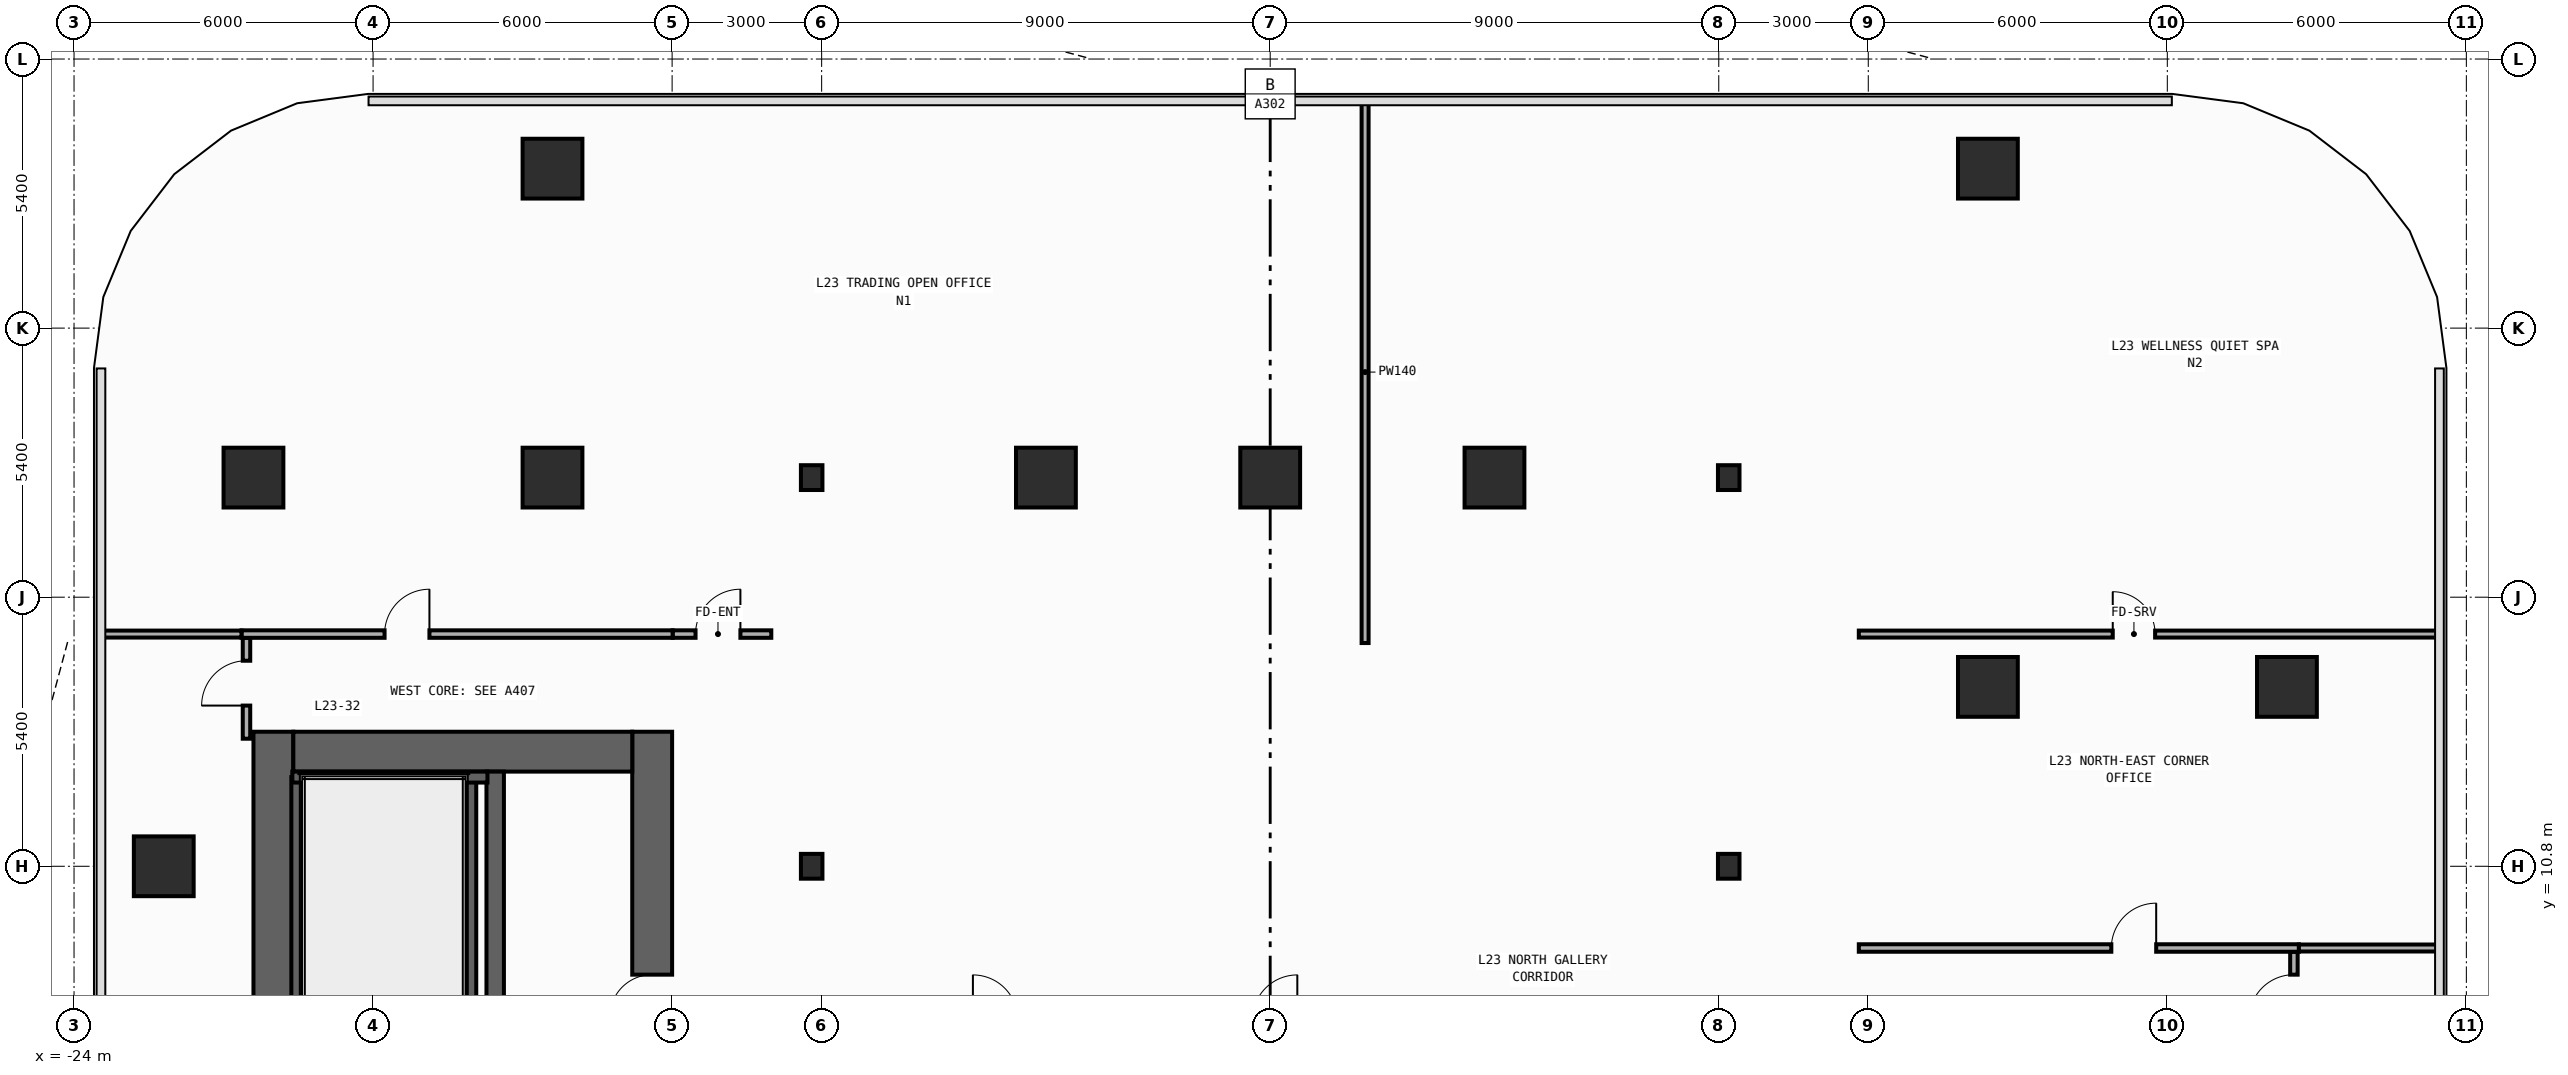
"""IFC4 building model, lengths in metres.
Left out: names, types, materials, properties, quantities, classifications, styles, units other than length and angle.
Written with IfcOpenShell. Run it as: python <this file> out.ifc"""

import sys

from ifc_helpers import new_model, si_unit, direction, frame, frame_2d, origin, origin_2d, place, context, subcontext, project, spatial, rectangle, i_section, extrude, element, fill, save


model = new_model("IFC4")
c1 = context("Model", 3, precision=1e-05, world=origin(), true_north=direction((0.0, 1.0)))
c2 = subcontext(c1, "Body", "Model", "MODEL_VIEW")
j1 = project(units=[si_unit("LENGTHUNIT", "METRE"), si_unit("PLANEANGLEUNIT", "RADIAN")], contexts=[c1])
p1 = place(None, origin())
s1 = spatial("IfcSite", under=j1, at=p1, CompositionType="ELEMENT")
p2 = place(p1, origin())
s2 = spatial("IfcBuilding", under=s1, at=p2, CompositionType="ELEMENT")
p3 = place(p2, frame((0.0, 0.0, 101.6)))
s3 = spatial("IfcBuildingStorey", under=s2, at=p3, CompositionType="ELEMENT", Elevation=101.6)
p4 = place(p3, frame((-20.0, -13.5, 0.0), z_axis=(0.0, 0.0, 1.0), x_axis=(0.0, 1.0, 0.0)))
e1 = element("IfcWall", 1, at=p4, inside=s3, PredefinedType="SHEAR", context=c2, shape_type="SweptSolid", body=[
    extrude(rectangle(XDim=27.0, YDim=0.8, at=frame_2d((13.5, 0.0))), origin(), (0.0, 0.0, 1.0), 3.94),
])
p5 = place(p3, frame((-12.4, -13.5, 0.0), z_axis=(0.0, 0.0, 1.0), x_axis=(0.0, 1.0, 0.0)))
e2 = element("IfcWall", 2, at=p5, inside=s3, PredefinedType="SHEAR", context=c2, shape_type="SweptSolid", body=[
    extrude(rectangle(XDim=27.0, YDim=0.8, at=frame_2d((13.5, 0.0))), origin(), (0.0, 0.0, 1.0), 3.94),
])
p6 = place(p5, frame((10.35, 0.0, 0.0)))
e3 = element("IfcOpeningElement", 3, at=p6, cuts=e2, PredefinedType="OPENING", context=c2, shape_type="SweptSolid", body=[
    extrude(rectangle(XDim=1.1, YDim=2.2, at=frame_2d((0.55, 1.1))), frame((0.0, 0.41, 0.0), z_axis=(0.0, -1.0, 0.0), x_axis=(1.0, 0.0, 0.0)), (0.0, 0.0, 1.0), 0.82),
])
p7 = place(p5, frame((7.15, 0.0, 0.0)))
e4 = element("IfcOpeningElement", 4, at=p7, cuts=e2, PredefinedType="OPENING", context=c2, shape_type="SweptSolid", body=[
    extrude(rectangle(XDim=1.1, YDim=2.2, at=frame_2d((0.55, 1.1))), frame((0.0, 0.41, 0.0), z_axis=(0.0, -1.0, 0.0), x_axis=(1.0, 0.0, 0.0)), (0.0, 0.0, 1.0), 0.82),
])
p8 = place(p5, frame((3.95, 0.0, 0.0)))
e5 = element("IfcOpeningElement", 5, at=p8, cuts=e2, PredefinedType="OPENING", context=c2, shape_type="SweptSolid", body=[
    extrude(rectangle(XDim=1.1, YDim=2.2, at=frame_2d((0.55, 1.1))), frame((0.0, 0.41, 0.0), z_axis=(0.0, -1.0, 0.0), x_axis=(1.0, 0.0, 0.0)), (0.0, 0.0, 1.0), 0.82),
])
p9 = place(p5, frame((15.175, 0.0, 0.0)))
e6 = element("IfcOpeningElement", 6, at=p9, cuts=e2, PredefinedType="OPENING", context=c2, shape_type="SweptSolid", body=[
    extrude(rectangle(XDim=0.85, YDim=2.1, at=frame_2d((0.425, 1.05))), frame((0.0, 0.41, 0.0), z_axis=(0.0, -1.0, 0.0), x_axis=(1.0, 0.0, 0.0)), (0.0, 0.0, 1.0), 0.82),
])
p10 = place(p5, frame((21.275, 0.0, 0.0)))
e7 = element("IfcOpeningElement", 7, at=p10, cuts=e2, PredefinedType="OPENING", context=c2, shape_type="SweptSolid", body=[
    extrude(rectangle(XDim=0.85, YDim=2.1, at=frame_2d((0.425, 1.05))), frame((0.0, 0.41, 0.0), z_axis=(0.0, -1.0, 0.0), x_axis=(1.0, 0.0, 0.0)), (0.0, 0.0, 1.0), 0.82),
])
p11 = place(p5, frame((12.725, 0.0, 0.0)))
e8 = element("IfcOpeningElement", 8, at=p11, cuts=e2, PredefinedType="OPENING", context=c2, shape_type="SweptSolid", body=[
    extrude(rectangle(XDim=1.15, YDim=2.2, at=frame_2d((0.575, 1.1))), frame((0.0, 0.41, 0.0), z_axis=(0.0, -1.0, 0.0), x_axis=(1.0, 0.0, 0.0)), (0.0, 0.0, 1.0), 0.82),
])
p12 = place(p5, frame((1.625, 0.0, 0.0)))
e9 = element("IfcOpeningElement", 9, at=p12, cuts=e2, PredefinedType="OPENING", context=c2, shape_type="SweptSolid", body=[
    extrude(rectangle(XDim=0.85, YDim=2.1, at=frame_2d((0.425, 1.05))), frame((0.0, 0.41, 0.0), z_axis=(0.0, -1.0, 0.0), x_axis=(1.0, 0.0, 0.0)), (0.0, 0.0, 1.0), 0.82),
])
p13 = place(p3, frame((-19.6, 13.1, 0.0), z_axis=(0.0, 0.0, 1.0), x_axis=(1.0, 0.0, 0.0)))
e10 = element("IfcWall", 10, at=p13, inside=s3, PredefinedType="SHEAR", context=c2, shape_type="SweptSolid", body=[
    extrude(rectangle(XDim=6.8, YDim=0.8, at=frame_2d((3.4, 0.0))), origin(), (0.0, 0.0, 1.0), 3.94),
])
p14 = place(p3, frame((-15.55, -12.7, 0.0), z_axis=(0.0, 0.0, 1.0), x_axis=(0.0, 1.0, 0.0)))
e11 = element("IfcWall", 11, at=p14, inside=s3, PredefinedType="SHEAR", context=c2, shape_type="SweptSolid", body=[
    extrude(rectangle(XDim=25.4, YDim=0.35, at=frame_2d((12.7, 0.0))), origin(), (0.0, 0.0, 1.0), 3.94),
])
p15 = place(p14, frame((11.925, 0.0, 0.0)))
e12 = element("IfcOpeningElement", 12, at=p15, cuts=e11, PredefinedType="OPENING", context=c2, shape_type="SweptSolid", body=[
    extrude(rectangle(XDim=1.15, YDim=2.2, at=frame_2d((0.575, 1.1))), frame((0.0, 0.185, 0.0), z_axis=(0.0, -1.0, 0.0), x_axis=(1.0, 0.0, 0.0)), (0.0, 0.0, 1.0), 0.37),
])
p16 = place(p14, frame((0.825, 0.0, 0.0)))
e13 = element("IfcOpeningElement", 13, at=p16, cuts=e11, PredefinedType="OPENING", context=c2, shape_type="SweptSolid", body=[
    extrude(rectangle(XDim=0.85, YDim=2.1, at=frame_2d((0.425, 1.05))), frame((0.0, 0.185, 0.0), z_axis=(0.0, -1.0, 0.0), x_axis=(1.0, 0.0, 0.0)), (0.0, 0.0, 1.0), 0.37),
])
for number, where, z_axis, x_axis in (
    (14, (-16.04, 1.29, 0.0), (0.0, 0.0, 1.0), (0.0, 1.0, 0.0)),
    (15, (-19.53, 1.29, 0.0), (0.0, 0.0, 1.0), (0.0, 1.0, 0.0)),
):
    element("IfcWall", number, at=place(p3, frame(where, z_axis=z_axis, x_axis=x_axis)), inside=s3, PredefinedType="SHEAR", context=c2, shape_type="SweptSolid", body=[
        extrude(rectangle(XDim=11.3, YDim=0.22, at=frame_2d((5.65, 0.0))), origin(), (0.0, 0.0, 1.0), 3.94),
    ])
p17 = place(p3, frame((-19.62, 12.59, 0.0), z_axis=(0.0, 0.0, 1.0), x_axis=(1.0, 0.0, 0.0)))
e16 = element("IfcWall", 16, at=p17, inside=s3, PredefinedType="SHEAR", context=c2, shape_type="SweptSolid", body=[
    extrude(rectangle(XDim=3.915, YDim=0.22, at=frame_2d((1.958, 0.0))), origin(), (0.0, 0.0, 1.0), 3.94),
])
for number, where, z_axis, x_axis in (
    (17, (-9.2, 10.8, 0.0), (0.0, 0.0, 1.0), (1.0, 0.0, 0.0)),
    (18, (-9.2, 18.6, 0.0), (0.0, 0.0, 1.0), (1.0, 0.0, 0.0)),
    (19, (9.2, 10.8, 0.0), (0.0, 0.0, 1.0), (1.0, 0.0, 0.0)),
    (20, (9.2, 18.6, 0.0), (0.0, 0.0, 1.0), (1.0, 0.0, 0.0)),
):
    element("IfcColumn", number, at=place(p3, frame(where, z_axis=z_axis, x_axis=x_axis)), inside=s3, PredefinedType="COLUMN", context=c2, shape_type="SweptSolid", body=[
        extrude(i_section(OverallWidth=0.432, OverallDepth=0.498, WebThickness=0.045, FlangeThickness=0.07, FilletRadius=0.022, at=origin_2d()), origin(), (0.0, 0.0, 1.0), 4.2),
    ])
for number, where, z_axis, x_axis in (
    (21, (-20.4, 18.6, 0.0), (0.0, 0.0, 1.0), (1.0, 0.0, 0.0)),
    (22, (20.4, 14.4, 0.0), (0.0, 0.0, 1.0), (1.0, 0.0, 0.0)),
    (23, (-14.4, 18.6, 0.0), (0.0, 0.0, 1.0), (1.0, 0.0, 0.0)),
    (24, (14.4, 14.4, 0.0), (0.0, 0.0, 1.0), (1.0, 0.0, 0.0)),
    (25, (-4.5, 18.6, 0.0), (0.0, 0.0, 1.0), (1.0, 0.0, 0.0)),
    (26, (0.0, 18.6, 0.0), (0.0, 0.0, 1.0), (1.0, 0.0, 0.0)),
    (27, (4.5, 18.6, 0.0), (0.0, 0.0, 1.0), (1.0, 0.0, 0.0)),
    (28, (-22.2, 10.8, 0.0), (0.0, 0.0, 1.0), (1.0, 0.0, 0.0)),
    (29, (-14.4, 24.8, 0.0), (0.0, 0.0, 1.0), (1.0, 0.0, 0.0)),
    (30, (14.4, 24.8, 0.0), (0.0, 0.0, 1.0), (1.0, 0.0, 0.0)),
):
    element("IfcColumn", number, at=place(p3, frame(where, z_axis=z_axis, x_axis=x_axis)), inside=s3, PredefinedType="COLUMN", context=c2, shape_type="SweptSolid", body=[
        extrude(rectangle(XDim=1.2, YDim=1.2, at=origin_2d()), origin(), (0.0, 0.0, 1.0), 4.2),
    ])
p18 = place(p3, frame((-11.99, 15.46, 0.0), z_axis=(0.0, 0.0, 1.0), x_axis=(1.0, 0.0, 0.0)))
e31 = element("IfcWall", 31, at=p18, inside=s3, PredefinedType="PARTITIONING", context=c2, shape_type="SweptSolid", body=[
    extrude(rectangle(XDim=1.98, YDim=0.15, at=frame_2d((0.99, 0.0))), origin(), (0.0, 0.0, 1.0), 3.94),
])
p19 = place(p18, frame((0.46, 0.0, 0.0)))
e32 = element("IfcOpeningElement", 32, at=p19, cuts=e31, PredefinedType="OPENING", context=c2, shape_type="SweptSolid", body=[
    extrude(rectangle(XDim=0.9, YDim=2.15, at=frame_2d((0.45, 1.075))), frame((0.0, 0.085, 0.0), z_axis=(0.0, -1.0, 0.0), x_axis=(1.0, 0.0, 0.0)), (0.0, 0.0, 1.0), 0.17),
])
p20 = place(p3, frame((-20.54, 13.36, 0.0), z_axis=(0.0, 0.0, 1.0), x_axis=(0.0, 1.0, 0.0)))
e33 = element("IfcWall", 33, at=p20, inside=s3, PredefinedType="PARTITIONING", context=c2, shape_type="SweptSolid", body=[
    extrude(rectangle(XDim=2.025, YDim=0.15, at=frame_2d((1.012, 0.0))), origin(), (0.0, 0.0, 1.0), 3.94),
])
p21 = place(p20, frame((0.665, 0.0, 0.0)))
e34 = element("IfcOpeningElement", 34, at=p21, cuts=e33, PredefinedType="OPENING", context=c2, shape_type="SweptSolid", body=[
    extrude(rectangle(XDim=0.9, YDim=2.15, at=frame_2d((0.45, 1.075))), frame((0.0, 0.085, 0.0), z_axis=(0.0, -1.0, 0.0), x_axis=(1.0, 0.0, 0.0)), (0.0, 0.0, 1.0), 0.17),
])
p22 = place(p3, frame((-20.64, 15.46, 0.0), z_axis=(0.0, 0.0, 1.0), x_axis=(1.0, 0.0, 0.0)))
e35 = element("IfcWall", 35, at=p22, inside=s3, PredefinedType="PARTITIONING", context=c2, shape_type="SweptSolid", body=[
    extrude(rectangle(XDim=8.65, YDim=0.15, at=frame_2d((4.325, 0.0))), origin(), (0.0, 0.0, 1.0), 3.94),
])
p23 = place(p22, frame((2.871, 0.0, 0.0)))
e36 = element("IfcOpeningElement", 36, at=p23, cuts=e35, PredefinedType="OPENING", context=c2, shape_type="SweptSolid", body=[
    extrude(rectangle(XDim=0.9, YDim=2.15, at=frame_2d((0.45, 1.075))), frame((0.0, 0.085, 0.0), z_axis=(0.0, -1.0, 0.0), x_axis=(1.0, 0.0, 0.0)), (0.0, 0.0, 1.0), 0.17),
])
p24 = place(p3, frame((20.54, 7.06, 0.0), z_axis=(0.0, 0.0, 1.0), x_axis=(0.0, 1.0, 0.0)))
e37 = element("IfcWall", 37, at=p24, inside=s3, PredefinedType="PARTITIONING", context=c2, shape_type="SweptSolid", body=[
    extrude(rectangle(XDim=2.025, YDim=0.15, at=frame_2d((1.012, 0.0))), origin(), (0.0, 0.0, 1.0), 3.94),
])
p25 = place(p24, frame((0.665, 0.0, 0.0)))
e38 = element("IfcOpeningElement", 38, at=p25, cuts=e37, PredefinedType="OPENING", context=c2, shape_type="SweptSolid", body=[
    extrude(rectangle(XDim=0.9, YDim=2.15, at=frame_2d((0.45, 1.075))), frame((0.0, 0.085, 0.0), z_axis=(0.0, -1.0, 0.0), x_axis=(1.0, 0.0, 0.0)), (0.0, 0.0, 1.0), 0.17),
])
p26 = place(p3, frame((11.81, 9.16, 0.0), z_axis=(0.0, 0.0, 1.0), x_axis=(1.0, 0.0, 0.0)))
e39 = element("IfcWall", 39, at=p26, inside=s3, PredefinedType="PARTITIONING", context=c2, shape_type="SweptSolid", body=[
    extrude(rectangle(XDim=8.83, YDim=0.15, at=frame_2d((4.415, 0.0))), origin(), (0.0, 0.0, 1.0), 3.94),
])
p27 = place(p26, frame((5.067, 0.0, 0.0)))
e40 = element("IfcOpeningElement", 40, at=p27, cuts=e39, PredefinedType="OPENING", context=c2, shape_type="SweptSolid", body=[
    extrude(rectangle(XDim=0.9, YDim=2.15, at=frame_2d((0.45, 1.075))), frame((0.0, 0.085, 0.0), z_axis=(0.0, -1.0, 0.0), x_axis=(1.0, 0.0, 0.0)), (0.0, 0.0, 1.0), 0.17),
])
for number, where, z_axis, x_axis in (
    (41, (-23.455, 15.46, 0.0), (0.0, 0.0, 1.0), (1.0, 0.0, 0.0)),
    (42, (20.64, 9.16, 0.0), (0.0, 0.0, 1.0), (1.0, 0.0, 0.0)),
):
    element("IfcWall", number, at=place(p3, frame(where, z_axis=z_axis, x_axis=x_axis)), inside=s3, PredefinedType="PARTITIONING", context=c2, shape_type="SweptSolid", body=[
        extrude(rectangle(XDim=2.815, YDim=0.14, at=frame_2d((1.408, 0.0))), origin(), (0.0, 0.0, 1.0), 3.94),
    ])
p28 = place(p3, frame((11.81, 15.46, 0.0), z_axis=(0.0, 0.0, 1.0), x_axis=(1.0, 0.0, 0.0)))
e43 = element("IfcWall", 43, at=p28, inside=s3, PredefinedType="PARTITIONING", context=c2, shape_type="SweptSolid", body=[
    extrude(rectangle(XDim=11.645, YDim=0.14, at=frame_2d((5.823, 0.0))), origin(), (0.0, 0.0, 1.0), 3.94),
])
p29 = place(p28, frame((5.095, 0.0, 0.0)))
e44 = element("IfcOpeningElement", 44, at=p29, cuts=e43, PredefinedType="OPENING", context=c2, shape_type="SweptSolid", body=[
    extrude(rectangle(XDim=0.85, YDim=2.1, at=frame_2d((0.425, 1.05))), frame((0.0, 0.08, 0.0), z_axis=(0.0, -1.0, 0.0), x_axis=(1.0, 0.0, 0.0)), (0.0, 0.0, 1.0), 0.16),
])
p30 = place(p3, frame((1.904, 15.28, 0.0), z_axis=(0.0, 0.0, 1.0), x_axis=(0.0, 1.0, 0.0)))
e45 = element("IfcWall", 45, at=p30, inside=s3, PredefinedType="PARTITIONING", context=c2, shape_type="SweptSolid", body=[
    extrude(rectangle(XDim=10.875, YDim=0.14, at=frame_2d((5.438, 0.0))), origin(), (0.0, 0.0, 1.0), 3.94),
])
p31 = place(p10, origin())
e46 = element("IfcDoor", 46, at=p31, inside=s3, OperationType="SINGLE_SWING_LEFT", PredefinedType="DOOR", context=c2, shape_type="SweptSolid", body=[
    extrude(rectangle(XDim=0.85, YDim=2.1, at=frame_2d((0.425, 1.05))), frame((0.0, 0.025, 0.0), z_axis=(0.0, -1.0, 0.0), x_axis=(1.0, 0.0, 0.0)), (0.0, 0.0, 1.0), 0.05),
])
fill(e7, e46)
p32 = place(p19, origin())
e47 = element("IfcDoor", 47, at=p32, inside=s3, OperationType="SINGLE_SWING_RIGHT", PredefinedType="DOOR", context=c2, shape_type="SweptSolid", body=[
    extrude(rectangle(XDim=0.9, YDim=2.15, at=frame_2d((0.45, 1.075))), frame((0.0, 0.025, 0.0), z_axis=(0.0, -1.0, 0.0), x_axis=(1.0, 0.0, 0.0)), (0.0, 0.0, 1.0), 0.05),
])
fill(e32, e47)
p33 = place(p21, origin())
e48 = element("IfcDoor", 48, at=p33, inside=s3, OperationType="SINGLE_SWING_LEFT", PredefinedType="DOOR", context=c2, shape_type="SweptSolid", body=[
    extrude(rectangle(XDim=0.9, YDim=2.15, at=frame_2d((0.45, 1.075))), frame((0.0, 0.025, 0.0), z_axis=(0.0, -1.0, 0.0), x_axis=(1.0, 0.0, 0.0)), (0.0, 0.0, 1.0), 0.05),
])
fill(e34, e48)
p34 = place(p23, origin())
e49 = element("IfcDoor", 49, at=p34, inside=s3, OperationType="SINGLE_SWING_RIGHT", PredefinedType="DOOR", context=c2, shape_type="SweptSolid", body=[
    extrude(rectangle(XDim=0.9, YDim=2.15, at=frame_2d((0.45, 1.075))), frame((0.0, 0.025, 0.0), z_axis=(0.0, -1.0, 0.0), x_axis=(1.0, 0.0, 0.0)), (0.0, 0.0, 1.0), 0.05),
])
fill(e36, e49)
p35 = place(p25, origin())
e50 = element("IfcDoor", 50, at=p35, inside=s3, OperationType="SINGLE_SWING_LEFT", PredefinedType="DOOR", context=c2, shape_type="SweptSolid", body=[
    extrude(rectangle(XDim=0.9, YDim=2.15, at=frame_2d((0.45, 1.075))), frame((0.0, 0.025, 0.0), z_axis=(0.0, -1.0, 0.0), x_axis=(1.0, 0.0, 0.0)), (0.0, 0.0, 1.0), 0.05),
])
fill(e38, e50)
p36 = place(p27, origin())
e51 = element("IfcDoor", 51, at=p36, inside=s3, OperationType="SINGLE_SWING_RIGHT", PredefinedType="DOOR", context=c2, shape_type="SweptSolid", body=[
    extrude(rectangle(XDim=0.9, YDim=2.15, at=frame_2d((0.45, 1.075))), frame((0.0, 0.025, 0.0), z_axis=(0.0, -1.0, 0.0), x_axis=(1.0, 0.0, 0.0)), (0.0, 0.0, 1.0), 0.05),
])
fill(e40, e51)
p37 = place(p29, origin())
e52 = element("IfcDoor", 52, at=p37, inside=s3, OperationType="SINGLE_SWING_LEFT", PredefinedType="DOOR", context=c2, shape_type="SweptSolid", body=[
    extrude(rectangle(XDim=0.85, YDim=2.1, at=frame_2d((0.425, 1.05))), frame((0.0, 0.025, 0.0), z_axis=(0.0, -1.0, 0.0), x_axis=(1.0, 0.0, 0.0)), (0.0, 0.0, 1.0), 0.05),
])
fill(e44, e52)
save(model, sys.argv[1])
